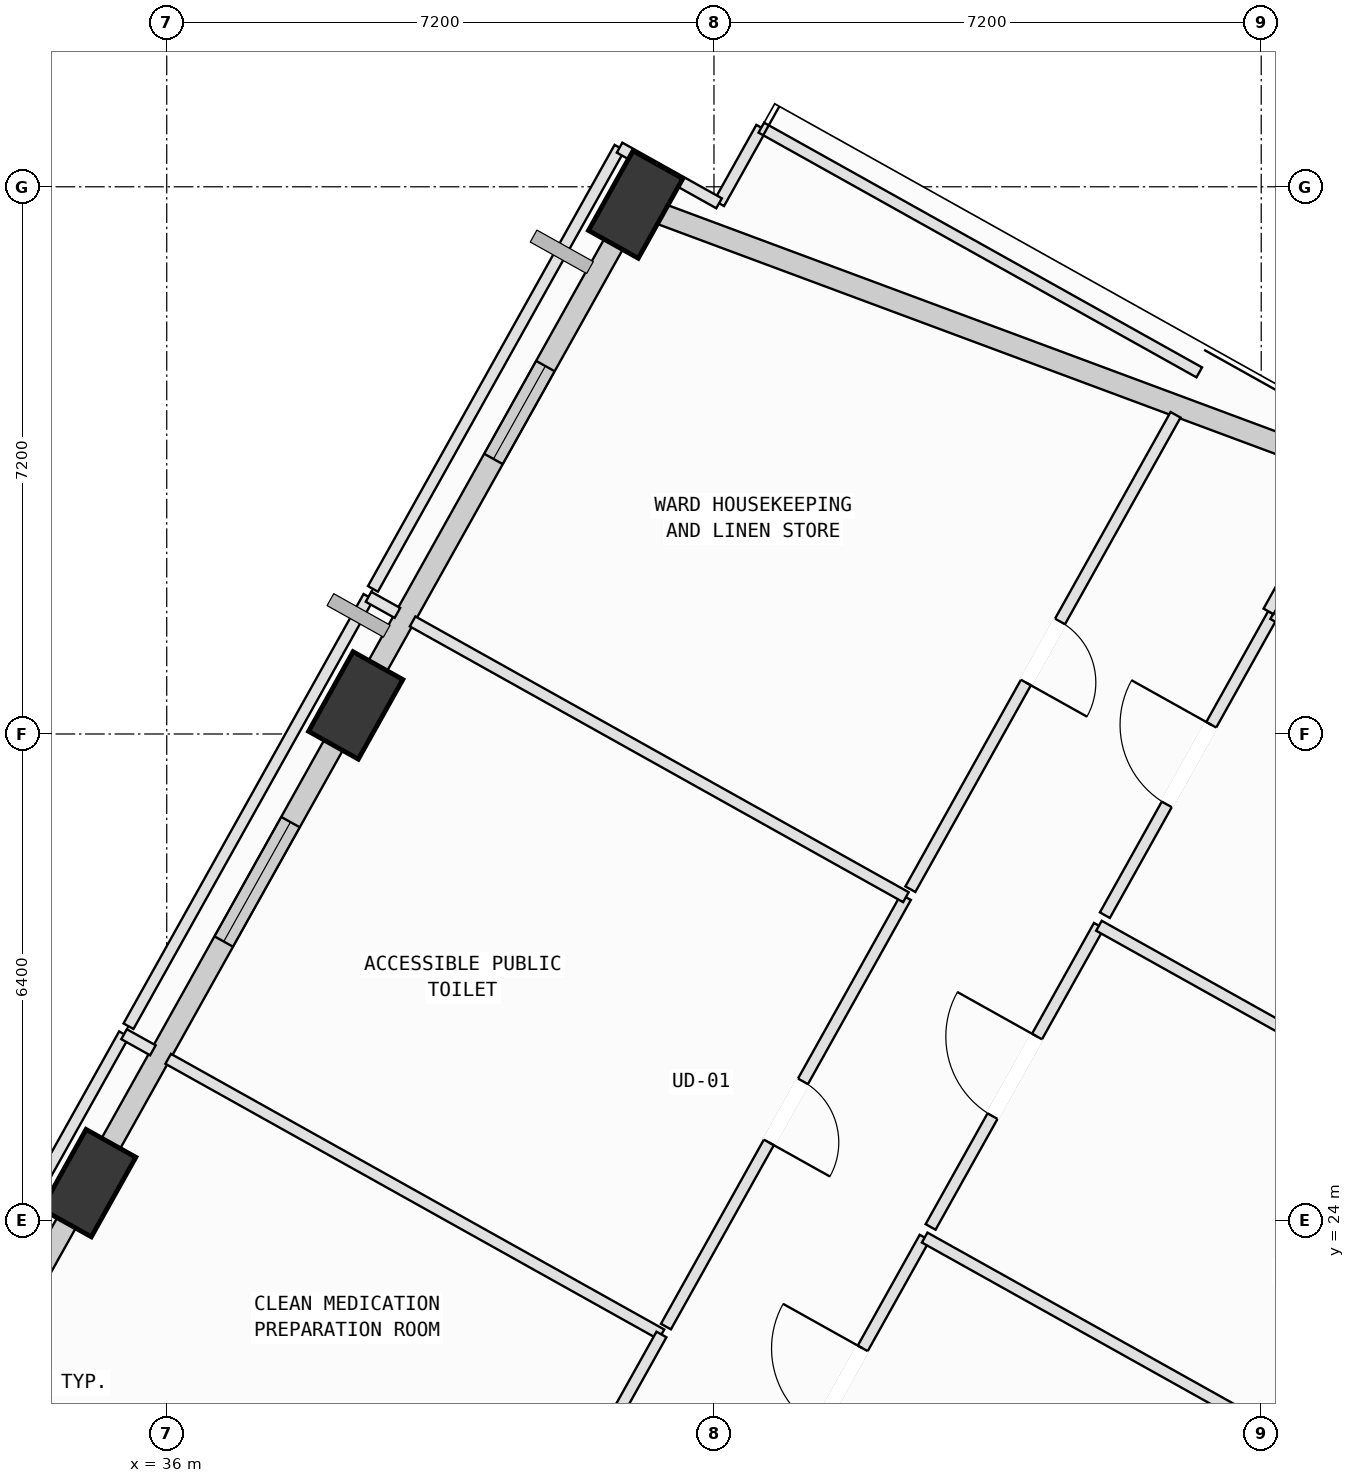
"""IFC4 building model, lengths in metres.
Left out: names, types, materials, properties, quantities, classifications, styles, units other than length and angle.
Written with IfcOpenShell. Run it as: python <this file> out.ifc"""

import sys

from ifc_helpers import new_model, si_unit, direction, frame, frame_2d, origin, origin_2d, place, context, subcontext, project, spatial, rectangle, extrude, element, fill, save


model = new_model("IFC4")
c1 = context("Model", 3, precision=1e-05, world=origin(), true_north=direction((0.0, 1.0)))
c2 = subcontext(c1, "Body", "Model", "MODEL_VIEW")
j1 = project(units=[si_unit("LENGTHUNIT", "METRE"), si_unit("PLANEANGLEUNIT", "RADIAN")], contexts=[c1])
p1 = place(None, origin())
s1 = spatial("IfcSite", under=j1, at=p1, CompositionType="ELEMENT")
p2 = place(p1, origin())
s2 = spatial("IfcBuilding", under=s1, at=p2, CompositionType="ELEMENT")
p3 = place(p2, frame((0.0, 0.0, 284.6)))
s3 = spatial("IfcBuildingStorey", under=s2, at=p3, CompositionType="ELEMENT", Elevation=284.6)
p4 = place(p3, frame((42.169, 37.366, 0.002), z_axis=(-0.052251426885, 0.034996871683, 0.998020544559), x_axis=(0.452347748556, -0.890150457988, 0.054896962759)))
e1 = element("IfcColumn", 1, at=p4, inside=s3, PredefinedType="COLUMN", context=c2, shape_type="SweptSolid", body=[
    extrude(rectangle(XDim=1.2, YDim=0.75, at=origin_2d()), origin(), (0.0, 0.0, 1.0), 4.004),
])
p5 = place(p3, frame((38.486, 30.776, 0.002), z_axis=(-0.024912426705, 0.020027637155, 0.999489001813), x_axis=(0.374314738542, -0.926881827121, 0.027902599586)))
e2 = element("IfcColumn", 2, at=p5, inside=s3, PredefinedType="COLUMN", context=c2, shape_type="SweptSolid", body=[
    extrude(rectangle(XDim=1.2, YDim=0.75, at=origin_2d()), origin(), (0.0, 0.0, 1.0), 3.998),
])
p6 = place(p3, frame((34.974, 24.49, 0.002), z_axis=(0.001221800679, 0.00574246319, 0.999982765511), x_axis=(-0.658837051571, -0.752268219843, 0.005124928444)))
e3 = element("IfcColumn", 3, at=p6, inside=s3, PredefinedType="COLUMN", context=c2, shape_type="SweptSolid", body=[
    extrude(rectangle(XDim=1.2, YDim=0.75, at=origin_2d()), origin(), (0.0, 0.0, 1.0), 3.996),
])
p7 = place(p3, frame((42.426, 37.271, 0.0), z_axis=(0.0, 0.0, 1.0), x_axis=(0.937221029634, -0.348735919588, 0.0)))
e4 = element("IfcWall", 4, at=p7, inside=s3, PredefinedType="SOLIDWALL", context=c2, shape_type="SweptSolid", body=[
    extrude(rectangle(XDim=9.037, YDim=0.28, at=frame_2d((4.518, 0.0))), origin(), (0.0, 0.0, 1.0), 3.265),
])
p8 = place(p3, frame((38.683, 31.127, 0.0), z_axis=(0.0, 0.0, 1.0), x_axis=(0.48784879731, 0.872928147652, 0.0)))
e5 = element("IfcWall", 5, at=p8, inside=s3, PredefinedType="SOLIDWALL", context=c2, shape_type="SweptSolid", body=[
    extrude(rectangle(XDim=6.78, YDim=0.28, at=frame_2d((3.39, 0.0))), origin(), (0.0, 0.0, 1.0), 3.265),
])
p9 = place(p8, frame((3.312, 0.0, 0.75)))
e6 = element("IfcOpeningElement", 6, at=p9, cuts=e5, PredefinedType="OPENING", context=c2, shape_type="SweptSolid", body=[
    extrude(rectangle(XDim=1.4, YDim=1.85, at=frame_2d((0.7, 0.925))), frame((0.0, 0.15, 0.0), z_axis=(0.0, -1.0, 0.0), x_axis=(1.0, 0.0, 0.0)), (0.0, 0.0, 1.0), 0.3),
])
p10 = place(p3, frame((35.173, 24.847, 0.0), z_axis=(0.0, 0.0, 1.0), x_axis=(0.487834163492, 0.872936325817, 0.0)))
e7 = element("IfcWall", 7, at=p10, inside=s3, PredefinedType="SOLIDWALL", context=c2, shape_type="SweptSolid", body=[
    extrude(rectangle(XDim=6.409, YDim=0.28, at=frame_2d((3.205, 0.0))), origin(), (0.0, 0.0, 1.0), 3.265),
])
p11 = place(p10, frame((3.233, 0.0, 0.75)))
e8 = element("IfcOpeningElement", 8, at=p11, cuts=e7, PredefinedType="OPENING", context=c2, shape_type="SweptSolid", body=[
    extrude(rectangle(XDim=1.8, YDim=2.05, at=frame_2d((0.9, 1.025))), frame((0.0, 0.15, 0.0), z_axis=(0.0, -1.0, 0.0), x_axis=(1.0, 0.0, 0.0)), (0.0, 0.0, 1.0), 0.3),
])
p12 = place(p3, frame((31.781, 18.778, 0.0), z_axis=(0.0, 0.0, 1.0), x_axis=(0.487859563913, 0.87292213049, 0.0)))
e9 = element("IfcWall", 9, at=p12, inside=s3, PredefinedType="SOLIDWALL", context=c2, shape_type="SweptSolid", body=[
    extrude(rectangle(XDim=6.158, YDim=0.28, at=frame_2d((3.079, 0.0))), origin(), (0.0, 0.0, 1.0), 3.265),
])
p13 = place(p12, frame((3.942, 0.0, 0.75)))
e10 = element("IfcOpeningElement", 10, at=p13, cuts=e9, PredefinedType="OPENING", context=c2, shape_type="SweptSolid", body=[
    extrude(rectangle(XDim=1.2, YDim=1.75, at=frame_2d((0.6, 0.875))), frame((0.0, 0.15, 0.0), z_axis=(0.0, -1.0, 0.0), x_axis=(1.0, 0.0, 0.0)), (0.0, 0.0, 1.0), 0.3),
])
p14 = place(p3, frame((43.757, 19.811, 0.0), z_axis=(0.0, 0.0, 1.0), x_axis=(0.487869568795, 0.872916538876, 0.0)))
e11 = element("IfcWall", 11, at=p14, inside=s3, PredefinedType="PARTITIONING", context=c2, shape_type="SweptSolid", body=[
    extrude(rectangle(XDim=4.54, YDim=0.15, at=frame_2d((2.27, 0.0))), origin(), (0.0, 0.0, 1.0), 3.78),
])
p15 = place(p14, frame((1.67, 0.0, 0.0)))
e12 = element("IfcOpeningElement", 12, at=p15, cuts=e11, PredefinedType="OPENING", context=c2, shape_type="SweptSolid", body=[
    extrude(rectangle(XDim=1.2, YDim=2.15, at=frame_2d((0.6, 1.075))), frame((0.0, 0.085, 0.0), z_axis=(0.0, -1.0, 0.0), x_axis=(1.0, 0.0, 0.0)), (0.0, 0.0, 1.0), 0.17),
])
p16 = place(p3, frame((45.972, 23.774, 0.0), z_axis=(0.0, 0.0, 1.0), x_axis=(0.872922597233, -0.487858728774, 0.0)))
e13 = element("IfcWall", 13, at=p16, inside=s3, PredefinedType="PARTITIONING", context=c2, shape_type="SweptSolid", body=[
    extrude(rectangle(XDim=10.835, YDim=0.15, at=frame_2d((5.417, 0.0))), origin(), (0.0, 0.0, 1.0), 3.78),
])
p17 = place(p3, frame((46.05, 23.914, 0.0), z_axis=(0.0, 0.0, 1.0), x_axis=(0.487869568795, 0.872916538876, 0.0)))
e14 = element("IfcWall", 14, at=p17, inside=s3, PredefinedType="PARTITIONING", context=c2, shape_type="SweptSolid", body=[
    extrude(rectangle(XDim=4.54, YDim=0.15, at=frame_2d((2.27, 0.0))), origin(), (0.0, 0.0, 1.0), 3.78),
])
p18 = place(p17, frame((1.67, 0.0, 0.0)))
e15 = element("IfcOpeningElement", 15, at=p18, cuts=e14, PredefinedType="OPENING", context=c2, shape_type="SweptSolid", body=[
    extrude(rectangle(XDim=1.2, YDim=2.15, at=frame_2d((0.6, 1.075))), frame((0.0, 0.085, 0.0), z_axis=(0.0, -1.0, 0.0), x_axis=(1.0, 0.0, 0.0)), (0.0, 0.0, 1.0), 0.17),
])
p19 = place(p3, frame((48.265, 27.877, 0.0), z_axis=(0.0, 0.0, 1.0), x_axis=(0.872922597233, -0.487858728774, 0.0)))
e16 = element("IfcWall", 16, at=p19, inside=s3, PredefinedType="PARTITIONING", context=c2, shape_type="SweptSolid", body=[
    extrude(rectangle(XDim=10.835, YDim=0.15, at=frame_2d((5.417, 0.0))), origin(), (0.0, 0.0, 1.0), 3.78),
])
p20 = place(p3, frame((48.343, 28.016, 0.0), z_axis=(0.0, 0.0, 1.0), x_axis=(0.487705632738, 0.873008141884, 0.0)))
e17 = element("IfcWall", 17, at=p20, inside=s3, PredefinedType="PARTITIONING", context=c2, shape_type="SweptSolid", body=[
    extrude(rectangle(XDim=4.539, YDim=0.15, at=frame_2d((2.27, 0.0))), origin(), (0.0, 0.0, 1.0), 3.78),
])
p21 = place(p20, frame((1.67, 0.0, 0.0)))
e18 = element("IfcOpeningElement", 18, at=p21, cuts=e17, PredefinedType="OPENING", context=c2, shape_type="SweptSolid", body=[
    extrude(rectangle(XDim=1.2, YDim=2.15, at=frame_2d((0.6, 1.075))), frame((0.0, 0.085, 0.0), z_axis=(0.0, -1.0, 0.0), x_axis=(1.0, 0.0, 0.0)), (0.0, 0.0, 1.0), 0.17),
])
p22 = place(p3, frame((50.557, 31.979, 0.0), z_axis=(0.0, 0.0, 1.0), x_axis=(0.872969446745, -0.487774891779, 0.0)))
e19 = element("IfcWall", 19, at=p22, inside=s3, PredefinedType="PARTITIONING", context=c2, shape_type="SweptSolid", body=[
    extrude(rectangle(XDim=8.832, YDim=0.15, at=frame_2d((4.416, 0.0))), origin(), (0.0, 0.0, 1.0), 3.78),
])
p23 = place(p22, frame((3.986, 0.0, 0.0)))
e20 = element("IfcOpeningElement", 20, at=p23, cuts=e19, PredefinedType="OPENING", context=c2, shape_type="SweptSolid", body=[
    extrude(rectangle(XDim=0.86, YDim=2.06, at=frame_2d((0.43, 1.03))), frame((0.0, 0.085, 0.0), z_axis=(0.0, -1.0, 0.0), x_axis=(1.0, 0.0, 0.0)), (0.0, 0.0, 1.0), 0.17),
])
p24 = place(p3, frame((32.442, 21.088, 0.0), z_axis=(0.0, 0.0, 1.0), x_axis=(0.487898852852, 0.872900171489, 0.0)))
e21 = element("IfcWall", 21, at=p24, inside=s3, PredefinedType="PARTITIONING", context=c2, shape_type="SweptSolid", body=[
    extrude(rectangle(XDim=6.143, YDim=0.15, at=frame_2d((3.071, 0.0))), origin(), (0.0, 0.0, 1.0), 3.78),
])
p25 = place(p3, frame((35.439, 26.45, 0.0), z_axis=(0.0, 0.0, 1.0), x_axis=(0.872908280471, -0.487884344784, 0.0)))
e22 = element("IfcWall", 22, at=p25, inside=s3, PredefinedType="PARTITIONING", context=c2, shape_type="SweptSolid", body=[
    extrude(rectangle(XDim=0.434, YDim=0.15, at=frame_2d((0.217, 0.0))), origin(), (0.0, 0.0, 1.0), 3.78),
])
p26 = place(p3, frame((36.019, 26.126, 0.0), z_axis=(0.0, 0.0, 1.0), x_axis=(0.872932377171, -0.487841229179, 0.0)))
e23 = element("IfcWall", 23, at=p26, inside=s3, PredefinedType="PARTITIONING", context=c2, shape_type="SweptSolid", body=[
    extrude(rectangle(XDim=7.435, YDim=0.15, at=frame_2d((3.717, 0.0))), origin(), (0.0, 0.0, 1.0), 3.78),
])
p27 = place(p3, frame((42.509, 22.499, 0.0), z_axis=(0.0, 0.0, 1.0), x_axis=(-0.487777705872, -0.872967874354, 0.0)))
e24 = element("IfcWall", 24, at=p27, inside=s3, PredefinedType="PARTITIONING", context=c2, shape_type="SweptSolid", body=[
    extrude(rectangle(XDim=6.142, YDim=0.15, at=frame_2d((3.071, 0.0))), origin(), (0.0, 0.0, 1.0), 3.78),
])
p28 = place(p3, frame((45.725, 28.253, 0.0), z_axis=(0.0, 0.0, 1.0), x_axis=(-0.487784157337, -0.872964269515, 0.0)))
e25 = element("IfcWall", 25, at=p28, inside=s3, PredefinedType="PARTITIONING", context=c2, shape_type="SweptSolid", body=[
    extrude(rectangle(XDim=6.472, YDim=0.15, at=frame_2d((3.236, 0.0))), origin(), (0.0, 0.0, 1.0), 3.78),
])
p29 = place(p28, frame((2.776, 0.0, 0.0)))
e26 = element("IfcOpeningElement", 26, at=p29, cuts=e25, PredefinedType="OPENING", context=c2, shape_type="SweptSolid", body=[
    extrude(rectangle(XDim=0.92, YDim=2.1, at=frame_2d((0.46, 1.05))), frame((0.0, 0.085, 0.0), z_axis=(0.0, -1.0, 0.0), x_axis=(1.0, 0.0, 0.0)), (0.0, 0.0, 1.0), 0.17),
])
p30 = place(p3, frame((35.497, 26.555, 0.0), z_axis=(0.0, 0.0, 1.0), x_axis=(0.487883067862, 0.872908994165, 0.0)))
e27 = element("IfcWall", 27, at=p30, inside=s3, PredefinedType="PARTITIONING", context=c2, shape_type="SweptSolid", body=[
    extrude(rectangle(XDim=6.473, YDim=0.15, at=frame_2d((3.236, 0.0))), origin(), (0.0, 0.0, 1.0), 3.265),
])
p31 = place(p3, frame((38.655, 32.205, 0.0), z_axis=(0.0, 0.0, 1.0), x_axis=(0.873069949715, -0.487594978343, 0.0)))
e28 = element("IfcWall", 28, at=p31, inside=s3, PredefinedType="PARTITIONING", context=c2, shape_type="SweptSolid", body=[
    extrude(rectangle(XDim=0.435, YDim=0.15, at=frame_2d((0.218, 0.0))), origin(), (0.0, 0.0, 1.0), 3.78),
])
p32 = place(p3, frame((39.235, 31.881, 0.0), z_axis=(0.0, 0.0, 1.0), x_axis=(0.872862453115, -0.487966328697, 0.0)))
e29 = element("IfcWall", 29, at=p32, inside=s3, PredefinedType="PARTITIONING", context=c2, shape_type="SweptSolid", body=[
    extrude(rectangle(XDim=7.435, YDim=0.15, at=frame_2d((3.718, 0.0))), origin(), (0.0, 0.0, 1.0), 3.78),
])
p33 = place(p3, frame((43.267, 37.383, 0.0), z_axis=(0.0, 0.0, 1.0), x_axis=(0.487787748021, 0.872962263148, 0.0)))
e30 = element("IfcWall", 30, at=p33, inside=s3, PredefinedType="PARTITIONING", context=c2, shape_type="SweptSolid", body=[
    extrude(rectangle(XDim=1.14, YDim=0.15, at=frame_2d((0.57, 0.0))), origin(), (0.0, 0.0, 1.0), 3.78),
])
p34 = place(p3, frame((43.823, 38.378, 0.0), z_axis=(0.0, 0.0, 1.0), x_axis=(0.872940239318, -0.487827160559, 0.0)))
e31 = element("IfcWall", 31, at=p34, inside=s3, PredefinedType="PARTITIONING", context=c2, shape_type="SweptSolid", body=[
    extrude(rectangle(XDim=6.601, YDim=0.15, at=frame_2d((3.3, 0.0))), origin(), (0.0, 0.0, 1.0), 3.265),
])
p35 = place(p3, frame((49.273, 34.6, 0.0), z_axis=(0.0, 0.0, 1.0), x_axis=(-0.487899403607, -0.87289986365, 0.0)))
e32 = element("IfcWall", 32, at=p35, inside=s3, PredefinedType="PARTITIONING", context=c2, shape_type="SweptSolid", body=[
    extrude(rectangle(XDim=7.151, YDim=0.15, at=frame_2d((3.576, 0.0))), origin(), (0.0, 0.0, 1.0), 3.78),
])
p36 = place(p35, frame((3.115, 0.0, 0.0)))
e33 = element("IfcOpeningElement", 33, at=p36, cuts=e32, PredefinedType="OPENING", context=c2, shape_type="SweptSolid", body=[
    extrude(rectangle(XDim=0.92, YDim=2.1, at=frame_2d((0.46, 1.05))), frame((0.0, 0.085, 0.0), z_axis=(0.0, -1.0, 0.0), x_axis=(1.0, 0.0, 0.0)), (0.0, 0.0, 1.0), 0.17),
])
p37 = place(p3, frame((38.713, 32.309, 0.0), z_axis=(0.0, 0.0, 1.0), x_axis=(0.487894574141, 0.872902563018, 0.0)))
e34 = element("IfcWall", 34, at=p37, inside=s3, PredefinedType="PARTITIONING", context=c2, shape_type="SweptSolid", body=[
    extrude(rectangle(XDim=6.651, YDim=0.15, at=frame_2d((3.326, 0.0))), origin(), (0.0, 0.0, 1.0), 3.265),
])
p38 = place(p3, frame((41.958, 38.115, 0.0), z_axis=(0.0, 0.0, 1.0), x_axis=(0.872833365232, -0.488018356763, 0.0)))
e35 = element("IfcWall", 35, at=p38, inside=s3, PredefinedType="PARTITIONING", context=c2, shape_type="SweptSolid", body=[
    extrude(rectangle(XDim=1.5, YDim=0.15, at=frame_2d((0.75, 0.0))), origin(), (0.0, 0.0, 1.0), 3.265),
])
p39 = place(p3, frame((50.496, 32.013, 0.0), z_axis=(0.0, 0.0, 1.0), x_axis=(0.487910811587, 0.872893487166, 0.0)))
e36 = element("IfcWall", 36, at=p39, inside=s3, PredefinedType="PARTITIONING", context=c2, shape_type="SweptSolid", body=[
    extrude(rectangle(XDim=2.019, YDim=0.15, at=frame_2d((1.009, 0.0))), origin(), (0.0, 0.0, 1.0), 3.78),
])
p40 = place(p9, origin())
e37 = element("IfcWindow", 37, at=p40, inside=s3, PartitioningType="SINGLE_PANEL", PredefinedType="WINDOW", context=c2, shape_type="SweptSolid", body=[
    extrude(rectangle(XDim=1.4, YDim=1.85, at=frame_2d((0.7, 0.925))), frame((0.0, 0.03, 0.0), z_axis=(0.0, -1.0, 0.0), x_axis=(1.0, 0.0, 0.0)), (0.0, 0.0, 1.0), 0.06),
])
fill(e6, e37)
p41 = place(p11, origin())
e38 = element("IfcWindow", 38, at=p41, inside=s3, PartitioningType="SINGLE_PANEL", PredefinedType="WINDOW", context=c2, shape_type="SweptSolid", body=[
    extrude(rectangle(XDim=1.8, YDim=2.05, at=frame_2d((0.9, 1.025))), frame((0.0, 0.03, 0.0), z_axis=(0.0, -1.0, 0.0), x_axis=(1.0, 0.0, 0.0)), (0.0, 0.0, 1.0), 0.06),
])
fill(e8, e38)
p42 = place(p15, origin())
e39 = element("IfcDoor", 39, at=p42, inside=s3, OperationType="SINGLE_SWING_RIGHT", PredefinedType="DOOR", context=c2, shape_type="SweptSolid", body=[
    extrude(rectangle(XDim=1.2, YDim=2.15, at=frame_2d((0.6, 1.075))), frame((0.0, 0.025, 0.0), z_axis=(0.0, -1.0, 0.0), x_axis=(1.0, 0.0, 0.0)), (0.0, 0.0, 1.0), 0.05),
])
fill(e12, e39)
p43 = place(p18, origin())
e40 = element("IfcDoor", 40, at=p43, inside=s3, OperationType="SINGLE_SWING_RIGHT", PredefinedType="DOOR", context=c2, shape_type="SweptSolid", body=[
    extrude(rectangle(XDim=1.2, YDim=2.15, at=frame_2d((0.6, 1.075))), frame((0.0, 0.025, 0.0), z_axis=(0.0, -1.0, 0.0), x_axis=(1.0, 0.0, 0.0)), (0.0, 0.0, 1.0), 0.05),
])
fill(e15, e40)
p44 = place(p21, origin())
e41 = element("IfcDoor", 41, at=p44, inside=s3, OperationType="SINGLE_SWING_RIGHT", PredefinedType="DOOR", context=c2, shape_type="SweptSolid", body=[
    extrude(rectangle(XDim=1.2, YDim=2.15, at=frame_2d((0.6, 1.075))), frame((0.0, 0.025, 0.0), z_axis=(0.0, -1.0, 0.0), x_axis=(1.0, 0.0, 0.0)), (0.0, 0.0, 1.0), 0.05),
])
fill(e18, e41)
p45 = place(p29, origin())
e42 = element("IfcDoor", 42, at=p45, inside=s3, OperationType="SINGLE_SWING_RIGHT", PredefinedType="DOOR", context=c2, shape_type="SweptSolid", body=[
    extrude(rectangle(XDim=0.92, YDim=2.1, at=frame_2d((0.46, 1.05))), frame((0.0, 0.025, 0.0), z_axis=(0.0, -1.0, 0.0), x_axis=(1.0, 0.0, 0.0)), (0.0, 0.0, 1.0), 0.05),
])
fill(e26, e42)
p46 = place(p36, origin())
e43 = element("IfcDoor", 43, at=p46, inside=s3, OperationType="SINGLE_SWING_RIGHT", PredefinedType="DOOR", context=c2, shape_type="SweptSolid", body=[
    extrude(rectangle(XDim=0.92, YDim=2.1, at=frame_2d((0.46, 1.05))), frame((0.0, 0.025, 0.0), z_axis=(0.0, -1.0, 0.0), x_axis=(1.0, 0.0, 0.0)), (0.0, 0.0, 1.0), 0.05),
])
fill(e33, e43)
save(model, sys.argv[1])
